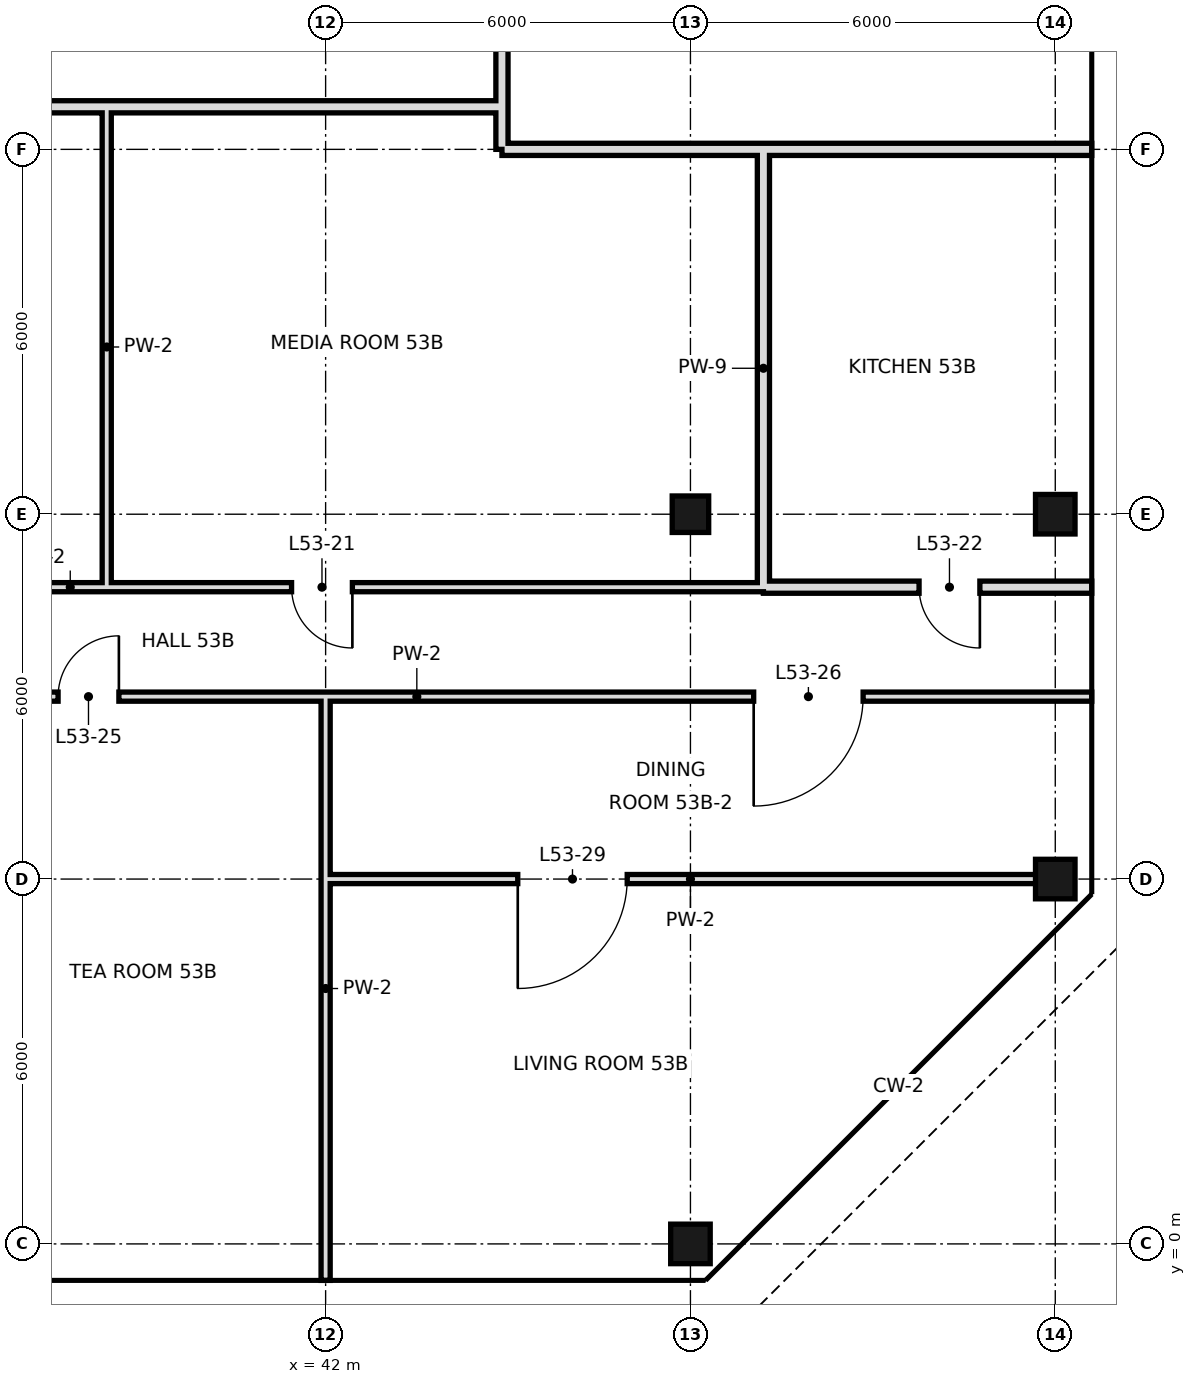
"""IFC4 building model, lengths in metres.
Left out: names, types, materials, properties, quantities, classifications, styles, units other than length and angle.
Written with IfcOpenShell. Run it as: python <this file> out.ifc"""

import sys

from ifc_helpers import new_model, si_unit, direction, frame, frame_2d, origin, origin_2d, place, context, subcontext, project, spatial, rectangle, hollow_rectangle, extrude, element, fill, save


model = new_model("IFC4")
c1 = context("Model", 3, precision=1e-05, world=origin(), true_north=direction((0.0, 1.0)))
c2 = subcontext(c1, "Body", "Model", "MODEL_VIEW")
j1 = project(units=[si_unit("LENGTHUNIT", "METRE"), si_unit("PLANEANGLEUNIT", "RADIAN")], contexts=[c1])
p1 = place(None, origin())
s1 = spatial("IfcSite", under=j1, at=p1, CompositionType="ELEMENT")
p2 = place(p1, origin())
s2 = spatial("IfcBuilding", under=s1, at=p2, CompositionType="ELEMENT")
p3 = place(p2, frame((0.0, 0.0, 226.2)))
s3 = spatial("IfcBuildingStorey", under=s2, at=p3, CompositionType="ELEMENT", Elevation=226.2)
p4 = place(p3, frame((48.0, 0.0, 0.0), z_axis=(0.0, 0.0, 1.0), x_axis=(1.0, 0.0, 0.0)))
e1 = element("IfcColumn", 1, at=p4, inside=s3, PredefinedType="COLUMN", context=c2, shape_type="SweptSolid", body=[
    extrude(hollow_rectangle(XDim=0.65, YDim=0.65, WallThickness=0.032, at=origin_2d()), origin(), (0.0, 0.0, 1.0), 3.6),
])
p5 = place(p3, frame((48.0, 12.0, 0.0), z_axis=(0.0, 0.0, 1.0), x_axis=(1.0, 0.0, 0.0)))
e2 = element("IfcColumn", 2, at=p5, inside=s3, PredefinedType="COLUMN", context=c2, shape_type="SweptSolid", body=[
    extrude(hollow_rectangle(XDim=0.6, YDim=0.6, WallThickness=0.028, at=origin_2d()), origin(), (0.0, 0.0, 1.0), 3.6),
])
for number, where, z_axis, x_axis in (
    (3, (54.0, 6.0, 0.0), (0.0, 0.0, 1.0), (1.0, 0.0, 0.0)),
    (4, (54.0, 12.0, 0.0), (0.0, 0.0, 1.0), (1.0, 0.0, 0.0)),
):
    element("IfcColumn", number, at=place(p3, frame(where, z_axis=z_axis, x_axis=x_axis)), inside=s3, PredefinedType="COLUMN", context=c2, shape_type="SweptSolid", body=[
        extrude(hollow_rectangle(XDim=0.65, YDim=0.65, WallThickness=0.032, at=origin_2d()), origin(), (0.0, 0.0, 1.0), 3.6),
    ])
p6 = place(p3, frame((38.4, 10.8, 0.0), z_axis=(0.0, 0.0, 1.0), x_axis=(0.0, 1.0, 0.0)))
e5 = element("IfcWall", 5, at=p6, inside=s3, PredefinedType="PARTITIONING", context=c2, shape_type="SweptSolid", body=[
    extrude(rectangle(XDim=7.9, YDim=0.15, at=frame_2d((3.95, 0.0))), origin(), (0.0, 0.0, 1.0), 3.42),
])
p7 = place(p3, frame((42.0, -0.6, 0.0), z_axis=(0.0, 0.0, 1.0), x_axis=(0.0, 1.0, 0.0)))
e6 = element("IfcWall", 6, at=p7, inside=s3, PredefinedType="PARTITIONING", context=c2, shape_type="SweptSolid", body=[
    extrude(rectangle(XDim=9.6, YDim=0.15, at=frame_2d((4.8, 0.0))), origin(), (0.0, 0.0, 1.0), 2.72),
])
p8 = place(p3, frame((44.9, 18.0, 0.0), z_axis=(0.0, 0.0, 1.0), x_axis=(0.0, 1.0, 0.0)))
e7 = element("IfcWall", 7, at=p8, inside=s3, PredefinedType="SOLIDWALL", context=c2, shape_type="SweptSolid", body=[
    extrude(rectangle(XDim=30.6, YDim=0.2, at=frame_2d((15.3, 0.0))), origin(), (0.0, 0.0, 1.0), 2.72),
])
p9 = place(p8, frame((9.23, 0.0, 0.0)))
e8 = element("IfcOpeningElement", 8, at=p9, cuts=e7, PredefinedType="OPENING", context=c2, shape_type="SweptSolid", body=[
    extrude(rectangle(XDim=1.2, YDim=2.4, at=frame_2d((0.6, 1.2))), frame((0.0, 0.11, 0.0), z_axis=(0.0, -1.0, 0.0), x_axis=(1.0, 0.0, 0.0)), (0.0, 0.0, 1.0), 0.22),
])
p10 = place(p3, frame((49.2, 10.8, 0.0), z_axis=(0.0, 0.0, 1.0), x_axis=(0.0, 1.0, 0.0)))
e9 = element("IfcWall", 9, at=p10, inside=s3, PredefinedType="SOLIDWALL", context=c2, shape_type="SweptSolid", body=[
    extrude(rectangle(XDim=7.2, YDim=0.2, at=frame_2d((3.6, 0.0))), origin(), (0.0, 0.0, 1.0), 2.97),
])
p11 = place(p3, frame((49.2, 10.8, 0.0), z_axis=(0.0, 0.0, 1.0), x_axis=(1.0, 0.0, 0.0)))
e10 = element("IfcWall", 10, at=p11, inside=s3, PredefinedType="SOLIDWALL", context=c2, shape_type="SweptSolid", body=[
    extrude(rectangle(XDim=5.4, YDim=0.2, at=frame_2d((2.7, 0.0))), origin(), (0.0, 0.0, 1.0), 2.97),
])
p12 = place(p11, frame((2.56, 0.0, 0.0)))
e11 = element("IfcOpeningElement", 11, at=p12, cuts=e10, PredefinedType="OPENING", context=c2, shape_type="SweptSolid", body=[
    extrude(rectangle(XDim=1.0, YDim=2.4, at=frame_2d((0.5, 1.2))), frame((0.0, 0.11, 0.0), z_axis=(0.0, -1.0, 0.0), x_axis=(1.0, 0.0, 0.0)), (0.0, 0.0, 1.0), 0.22),
])
p13 = place(p3, frame((26.4, 10.8, 0.0), z_axis=(0.0, 0.0, 1.0), x_axis=(1.0, 0.0, 0.0)))
e12 = element("IfcWall", 12, at=p13, inside=s3, PredefinedType="PARTITIONING", context=c2, shape_type="SweptSolid", body=[
    extrude(rectangle(XDim=22.8, YDim=0.15, at=frame_2d((11.4, 0.0))), origin(), (0.0, 0.0, 1.0), 3.42),
])
p14 = place(p13, frame((1.9, 0.0, 0.0)))
e13 = element("IfcOpeningElement", 13, at=p14, cuts=e12, PredefinedType="OPENING", context=c2, shape_type="SweptSolid", body=[
    extrude(rectangle(XDim=1.0, YDim=2.4, at=frame_2d((0.5, 1.2))), frame((0.0, 0.085, 0.0), z_axis=(0.0, -1.0, 0.0), x_axis=(1.0, 0.0, 0.0)), (0.0, 0.0, 1.0), 0.17),
])
p15 = place(p13, frame((7.9, 0.0, 0.0)))
e14 = element("IfcOpeningElement", 14, at=p15, cuts=e12, PredefinedType="OPENING", context=c2, shape_type="SweptSolid", body=[
    extrude(rectangle(XDim=1.0, YDim=2.4, at=frame_2d((0.5, 1.2))), frame((0.0, 0.085, 0.0), z_axis=(0.0, -1.0, 0.0), x_axis=(1.0, 0.0, 0.0)), (0.0, 0.0, 1.0), 0.17),
])
p16 = place(p13, frame((15.04, 0.0, 0.0)))
e15 = element("IfcOpeningElement", 15, at=p16, cuts=e12, PredefinedType="OPENING", context=c2, shape_type="SweptSolid", body=[
    extrude(rectangle(XDim=1.0, YDim=2.4, at=frame_2d((0.5, 1.2))), frame((0.0, 0.085, 0.0), z_axis=(0.0, -1.0, 0.0), x_axis=(1.0, 0.0, 0.0)), (0.0, 0.0, 1.0), 0.17),
])
p17 = place(p3, frame((44.9, 18.0, 0.0), z_axis=(0.0, 0.0, 1.0), x_axis=(1.0, 0.0, 0.0)))
e16 = element("IfcWall", 16, at=p17, inside=s3, PredefinedType="SOLIDWALL", context=c2, shape_type="SweptSolid", body=[
    extrude(rectangle(XDim=4.3, YDim=0.2, at=frame_2d((2.15, 0.0))), origin(), (0.0, 0.0, 1.0), 2.72),
])
p18 = place(p3, frame((49.2, 18.0, 0.0), z_axis=(0.0, 0.0, 1.0), x_axis=(1.0, 0.0, 0.0)))
e17 = element("IfcWall", 17, at=p18, inside=s3, PredefinedType="SOLIDWALL", context=c2, shape_type="SweptSolid", body=[
    extrude(rectangle(XDim=5.4, YDim=0.2, at=frame_2d((2.7, 0.0))), origin(), (0.0, 0.0, 1.0), 2.72),
])
p19 = place(p3, frame((3.1, 18.7, 0.0), z_axis=(0.0, 0.0, 1.0), x_axis=(1.0, 0.0, 0.0)))
e18 = element("IfcWall", 18, at=p19, inside=s3, PredefinedType="SOLIDWALL", context=c2, shape_type="SweptSolid", body=[
    extrude(rectangle(XDim=41.8, YDim=0.2, at=frame_2d((20.9, 0.0))), origin(), (0.0, 0.0, 1.0), 2.72),
])
p20 = place(p19, frame((7.36, 0.0, 0.0)))
e19 = element("IfcOpeningElement", 19, at=p20, cuts=e18, PredefinedType="OPENING", context=c2, shape_type="SweptSolid", body=[
    extrude(rectangle(XDim=1.2, YDim=2.4, at=frame_2d((0.6, 1.2))), frame((0.0, 0.11, 0.0), z_axis=(0.0, -1.0, 0.0), x_axis=(1.0, 0.0, 0.0)), (0.0, 0.0, 1.0), 0.22),
])
p21 = place(p19, frame((24.48, 0.0, 0.0)))
e20 = element("IfcOpeningElement", 20, at=p21, cuts=e18, PredefinedType="OPENING", context=c2, shape_type="SweptSolid", body=[
    extrude(rectangle(XDim=1.2, YDim=2.4, at=frame_2d((0.6, 1.2))), frame((0.0, 0.11, 0.0), z_axis=(0.0, -1.0, 0.0), x_axis=(1.0, 0.0, 0.0)), (0.0, 0.0, 1.0), 0.22),
])
p22 = place(p3, frame((42.0, 6.0, 0.0), z_axis=(0.0, 0.0, 1.0), x_axis=(1.0, 0.0, 0.0)))
e21 = element("IfcWall", 21, at=p22, inside=s3, PredefinedType="PARTITIONING", context=c2, shape_type="SweptSolid", body=[
    extrude(rectangle(XDim=12.0, YDim=0.15, at=frame_2d((6.0, 0.0))), origin(), (0.0, 0.0, 1.0), 2.97),
])
p23 = place(p22, frame((3.16, 0.0, 0.0)))
e22 = element("IfcOpeningElement", 22, at=p23, cuts=e21, PredefinedType="OPENING", context=c2, shape_type="SweptSolid", body=[
    extrude(rectangle(XDim=1.8, YDim=2.4, at=frame_2d((0.9, 1.2))), frame((0.0, 0.085, 0.0), z_axis=(0.0, -1.0, 0.0), x_axis=(1.0, 0.0, 0.0)), (0.0, 0.0, 1.0), 0.17),
])
p24 = place(p3, frame((32.4, 9.0, 0.0), z_axis=(0.0, 0.0, 1.0), x_axis=(1.0, 0.0, 0.0)))
e23 = element("IfcWall", 23, at=p24, inside=s3, PredefinedType="PARTITIONING", context=c2, shape_type="SweptSolid", body=[
    extrude(rectangle(XDim=22.2, YDim=0.15, at=frame_2d((11.1, 0.0))), origin(), (0.0, 0.0, 1.0), 3.42),
])
p25 = place(p24, frame((0.88, 0.0, 0.0)))
e24 = element("IfcOpeningElement", 24, at=p25, cuts=e23, PredefinedType="OPENING", context=c2, shape_type="SweptSolid", body=[
    extrude(rectangle(XDim=1.0, YDim=2.4, at=frame_2d((0.5, 1.2))), frame((0.0, 0.085, 0.0), z_axis=(0.0, -1.0, 0.0), x_axis=(1.0, 0.0, 0.0)), (0.0, 0.0, 1.0), 0.17),
])
p26 = place(p24, frame((5.2, 0.0, 0.0)))
e25 = element("IfcOpeningElement", 25, at=p26, cuts=e23, PredefinedType="OPENING", context=c2, shape_type="SweptSolid", body=[
    extrude(rectangle(XDim=1.0, YDim=2.4, at=frame_2d((0.5, 1.2))), frame((0.0, 0.085, 0.0), z_axis=(0.0, -1.0, 0.0), x_axis=(1.0, 0.0, 0.0)), (0.0, 0.0, 1.0), 0.17),
])
p27 = place(p24, frame((16.64, 0.0, 0.0)))
e26 = element("IfcOpeningElement", 26, at=p27, cuts=e23, PredefinedType="OPENING", context=c2, shape_type="SweptSolid", body=[
    extrude(rectangle(XDim=1.8, YDim=2.4, at=frame_2d((0.9, 1.2))), frame((0.0, 0.085, 0.0), z_axis=(0.0, -1.0, 0.0), x_axis=(1.0, 0.0, 0.0)), (0.0, 0.0, 1.0), 0.17),
])
p28 = place(p16, origin())
e27 = element("IfcDoor", 27, at=p28, inside=s3, OperationType="SINGLE_SWING_RIGHT", PredefinedType="DOOR", context=c2, shape_type="SweptSolid", body=[
    extrude(rectangle(XDim=1.0, YDim=2.4, at=frame_2d((0.5, 1.2))), frame((0.0, 0.025, 0.0), z_axis=(0.0, -1.0, 0.0), x_axis=(1.0, 0.0, 0.0)), (0.0, 0.0, 1.0), 0.05),
])
fill(e15, e27)
p29 = place(p12, origin())
e28 = element("IfcDoor", 28, at=p29, inside=s3, OperationType="SINGLE_SWING_RIGHT", PredefinedType="DOOR", context=c2, shape_type="SweptSolid", body=[
    extrude(rectangle(XDim=1.0, YDim=2.4, at=frame_2d((0.5, 1.2))), frame((0.0, 0.025, 0.0), z_axis=(0.0, -1.0, 0.0), x_axis=(1.0, 0.0, 0.0)), (0.0, 0.0, 1.0), 0.05),
])
fill(e11, e28)
p30 = place(p26, frame((1.0, 0.0, 0.0), z_axis=(0.0, 0.0, 1.0), x_axis=(-1.0, 0.0, 0.0)))
e29 = element("IfcDoor", 29, at=p30, inside=s3, OperationType="SINGLE_SWING_LEFT", PredefinedType="DOOR", context=c2, shape_type="SweptSolid", body=[
    extrude(rectangle(XDim=1.0, YDim=2.4, at=frame_2d((0.5, 1.2))), frame((0.0, 0.025, 0.0), z_axis=(0.0, -1.0, 0.0), x_axis=(1.0, 0.0, 0.0)), (0.0, 0.0, 1.0), 0.05),
])
fill(e25, e29)
p31 = place(p27, frame((1.8, 0.0, 0.0), z_axis=(0.0, 0.0, 1.0), x_axis=(-1.0, 0.0, 0.0)))
e30 = element("IfcDoor", 30, at=p31, inside=s3, OperationType="SINGLE_SWING_RIGHT", PredefinedType="DOOR", context=c2, shape_type="SweptSolid", body=[
    extrude(rectangle(XDim=1.8, YDim=2.4, at=frame_2d((0.9, 1.2))), frame((0.0, 0.025, 0.0), z_axis=(0.0, -1.0, 0.0), x_axis=(1.0, 0.0, 0.0)), (0.0, 0.0, 1.0), 0.05),
])
fill(e26, e30)
p32 = place(p23, frame((1.8, 0.0, 0.0), z_axis=(0.0, 0.0, 1.0), x_axis=(-1.0, 0.0, 0.0)))
e31 = element("IfcDoor", 31, at=p32, inside=s3, OperationType="SINGLE_SWING_RIGHT", PredefinedType="DOOR", context=c2, shape_type="SweptSolid", body=[
    extrude(rectangle(XDim=1.8, YDim=2.4, at=frame_2d((0.9, 1.2))), frame((0.0, 0.025, 0.0), z_axis=(0.0, -1.0, 0.0), x_axis=(1.0, 0.0, 0.0)), (0.0, 0.0, 1.0), 0.05),
])
fill(e22, e31)
save(model, sys.argv[1])
